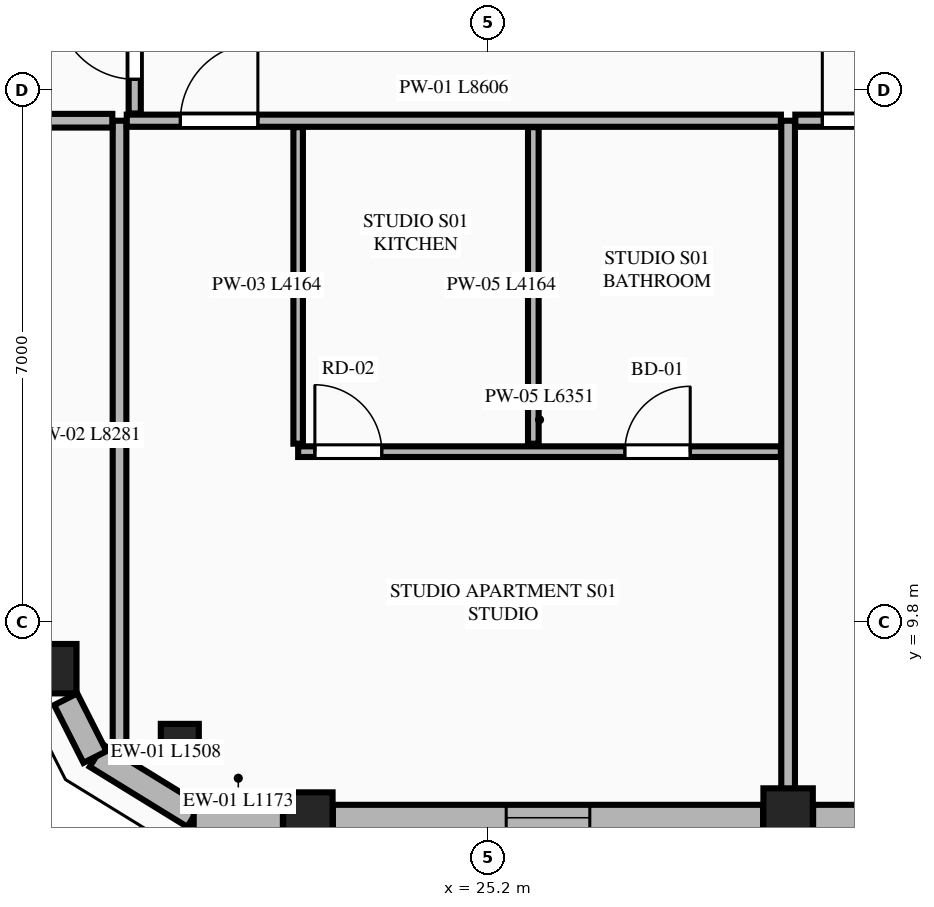
"""IFC4 building model, lengths in metres.
Left out: names, types, materials, properties, quantities, classifications, styles, units other than length and angle.
Written with IfcOpenShell. Run it as: python <this file> out.ifc"""

import sys

from ifc_helpers import new_model, si_unit, direction, frame, frame_2d, origin, origin_2d, place, context, subcontext, project, spatial, rectangle, extrude, element, fill, save


model = new_model("IFC4")
c1 = context("Model", 3, precision=1e-05, world=origin(), true_north=direction((0.0, 1.0)))
c2 = subcontext(c1, "Body", "Model", "MODEL_VIEW")
j1 = project(units=[si_unit("LENGTHUNIT", "METRE"), si_unit("PLANEANGLEUNIT", "RADIAN")], contexts=[c1])
p1 = place(None, origin())
s1 = spatial("IfcSite", under=j1, at=p1, CompositionType="ELEMENT")
p2 = place(p1, origin())
s2 = spatial("IfcBuilding", under=s1, at=p2, CompositionType="ELEMENT")
p3 = place(p2, frame((0.0, 0.0, 274.45)))
s3 = spatial("IfcBuildingStorey", under=s2, at=p3, CompositionType="ELEMENT", Elevation=274.45)
for number, where, z_axis, x_axis in (
    (1, (22.828, 7.239, 0.0), (0.0, 0.0, 1.0), (1.0, 0.0, 0.0)),
    (2, (29.146, 7.292, 0.0), (0.0, 0.0, 1.0), (1.0, 0.0, 0.0)),
    (3, (19.459, 9.191, 0.0), (0.0, 0.0, 1.0), (1.0, 0.0, 0.0)),
):
    element("IfcColumn", number, at=place(p3, frame(where, z_axis=z_axis, x_axis=x_axis)), inside=s3, PredefinedType="COLUMN", context=c2, shape_type="SweptSolid", body=[
        extrude(rectangle(XDim=0.65, YDim=0.65, at=origin_2d()), origin(), (0.0, 0.0, 1.0), 3.65),
    ])
p4 = place(p3, frame((21.143, 8.215, 0.0), z_axis=(0.0, 0.0, 1.0), x_axis=(0.865256437757, -0.501329529272, 0.0)))
e4 = element("IfcColumn", 4, at=p4, inside=s3, PredefinedType="PILASTER", context=c2, shape_type="SweptSolid", body=[
    extrude(rectangle(XDim=0.5, YDim=0.35, at=origin_2d()), origin(), (0.0, 0.0, 1.0), 3.65),
])
p5 = place(p3, frame((20.047, 8.045, 0.0), z_axis=(0.0, 0.0, 1.0), x_axis=(0.851680557619, -0.52406128246, 0.0)))
e5 = element("IfcWall", 5, at=p5, inside=s3, PredefinedType="STANDARD", context=c2, shape_type="SweptSolid", body=[
    extrude(rectangle(XDim=1.508, YDim=0.34, at=frame_2d((0.754, 0.0))), origin(), (0.0, 0.0, 1.0), 3.37),
])
p6 = place(p3, frame((21.326, 7.23, 0.0), z_axis=(0.0, 0.0, 1.0), x_axis=(1.0, 0.0, 0.0)))
e6 = element("IfcWall", 6, at=p6, inside=s3, PredefinedType="STANDARD", context=c2, shape_type="SweptSolid", body=[
    extrude(rectangle(XDim=1.173, YDim=0.34, at=frame_2d((0.586, 0.0))), origin(), (0.0, 0.0, 1.0), 3.37),
])
p7 = place(p3, frame((23.157, 7.23, 0.0), z_axis=(0.0, 0.0, 1.0), x_axis=(1.0, 0.0, 0.0)))
e7 = element("IfcWall", 7, at=p7, inside=s3, PredefinedType="STANDARD", context=c2, shape_type="SweptSolid", body=[
    extrude(rectangle(XDim=5.66, YDim=0.34, at=frame_2d((2.83, 0.0))), origin(), (0.0, 0.0, 1.0), 2.46),
])
p8 = place(p7, frame((2.28, 0.0, 0.75)))
e8 = element("IfcOpeningElement", 8, at=p8, cuts=e7, PredefinedType="OPENING", context=c2, shape_type="SweptSolid", body=[
    extrude(rectangle(XDim=1.1, YDim=1.56, at=frame_2d((0.55, 0.78))), frame((0.0, 0.18, 0.0), z_axis=(0.0, -1.0, 0.0), x_axis=(1.0, 0.0, 0.0)), (0.0, 0.0, 1.0), 0.36),
])
p9 = place(p3, frame((29.475, 7.23, 0.0), z_axis=(0.0, 0.0, 1.0), x_axis=(1.0, 0.0, 0.0)))
e9 = element("IfcWall", 9, at=p9, inside=s3, PredefinedType="STANDARD", context=c2, shape_type="SweptSolid", body=[
    extrude(rectangle(XDim=5.85, YDim=0.34, at=frame_2d((2.925, 0.0))), origin(), (0.0, 0.0, 1.0), 2.46),
])
p10 = place(p9, frame((2.375, 0.0, 0.0)))
e10 = element("IfcOpeningElement", 10, at=p10, cuts=e9, PredefinedType="OPENING", context=c2, shape_type="SweptSolid", body=[
    extrude(rectangle(XDim=1.1, YDim=2.25, at=frame_2d((0.55, 1.125))), frame((0.0, 0.18, 0.0), z_axis=(0.0, -1.0, 0.0), x_axis=(1.0, 0.0, 0.0)), (0.0, 0.0, 1.0), 0.36),
])
p11 = place(p3, frame((19.642, 8.789, 0.0), z_axis=(0.0, 0.0, 1.0), x_axis=(0.451907025977, -0.8920650424, 0.0)))
e11 = element("IfcWall", 11, at=p11, inside=s3, PredefinedType="STANDARD", context=c2, shape_type="SweptSolid", body=[
    extrude(rectangle(XDim=0.852, YDim=0.34, at=frame_2d((0.426, 0.0))), origin(), (0.0, 0.0, 1.0), 3.37),
])
p12 = place(p3, frame((20.35, 8.119, 0.0), z_axis=(0.0, 0.0, 1.0), x_axis=(0.0, 1.0, 0.0)))
e12 = element("IfcWall", 12, at=p12, inside=s3, PredefinedType="PARTITIONING", context=c2, shape_type="SweptSolid", body=[
    extrude(rectangle(XDim=8.281, YDim=0.18, at=frame_2d((4.141, 0.0))), origin(), (0.0, 0.0, 1.0), 3.37),
])
p13 = place(p3, frame((29.146, 7.405, 0.0), z_axis=(0.0, 0.0, 1.0), x_axis=(0.0, 1.0, 0.0)))
e13 = element("IfcWall", 13, at=p13, inside=s3, PredefinedType="PARTITIONING", context=c2, shape_type="SweptSolid", body=[
    extrude(rectangle(XDim=8.995, YDim=0.18, at=frame_2d((4.498, 0.0))), origin(), (0.0, 0.0, 1.0), 2.294),
])
p14 = place(p3, frame((20.445, 16.4, 0.0), z_axis=(0.0, 0.0, 1.0), x_axis=(1.0, 0.0, 0.0)))
e14 = element("IfcWall", 14, at=p14, inside=s3, PredefinedType="PARTITIONING", context=c2, shape_type="SweptSolid", body=[
    extrude(rectangle(XDim=8.606, YDim=0.16, at=frame_2d((4.303, 0.0))), origin(), (0.0, 0.0, 1.0), 3.37),
])
p15 = place(p14, frame((0.705, 0.0, 0.0)))
e15 = element("IfcOpeningElement", 15, at=p15, cuts=e14, PredefinedType="OPENING", context=c2, shape_type="SweptSolid", body=[
    extrude(rectangle(XDim=1.02, YDim=2.25, at=frame_2d((0.51, 1.125))), frame((0.0, 0.09, 0.0), z_axis=(0.0, -1.0, 0.0), x_axis=(1.0, 0.0, 0.0)), (0.0, 0.0, 1.0), 0.18),
])
p16 = place(p3, frame((22.7, 12.151, 0.0), z_axis=(0.0, 0.0, 1.0), x_axis=(0.0, 1.0, 0.0)))
e16 = element("IfcWall", 16, at=p16, inside=s3, PredefinedType="PARTITIONING", context=c2, shape_type="SweptSolid", body=[
    extrude(rectangle(XDim=4.164, YDim=0.125, at=frame_2d((2.082, 0.0))), origin(), (0.0, 0.0, 1.0), 2.677),
])
p17 = place(p3, frame((22.7, 12.046, 0.0), z_axis=(0.0, 0.0, 1.0), x_axis=(1.0, 0.0, 0.0)))
e17 = element("IfcWall", 17, at=p17, inside=s3, PredefinedType="PLUMBINGWALL", context=c2, shape_type="SweptSolid", body=[
    extrude(rectangle(XDim=6.351, YDim=0.14, at=frame_2d((3.176, 0.0))), origin(), (0.0, 0.0, 1.0), 3.37),
])
p18 = place(p17, frame((4.298, 0.0, 0.0)))
e18 = element("IfcOpeningElement", 18, at=p18, cuts=e17, PredefinedType="OPENING", context=c2, shape_type="SweptSolid", body=[
    extrude(rectangle(XDim=0.86, YDim=2.1, at=frame_2d((0.43, 1.05))), frame((0.0, 0.08, 0.0), z_axis=(0.0, -1.0, 0.0), x_axis=(1.0, 0.0, 0.0)), (0.0, 0.0, 1.0), 0.16),
])
p19 = place(p17, frame((0.22, 0.0, 0.0)))
e19 = element("IfcOpeningElement", 19, at=p19, cuts=e17, PredefinedType="OPENING", context=c2, shape_type="SweptSolid", body=[
    extrude(rectangle(XDim=0.88, YDim=2.15, at=frame_2d((0.44, 1.075))), frame((0.0, 0.08, 0.0), z_axis=(0.0, -1.0, 0.0), x_axis=(1.0, 0.0, 0.0)), (0.0, 0.0, 1.0), 0.16),
])
p20 = place(p3, frame((25.794, 12.151, 0.0), z_axis=(0.0, 0.0, 1.0), x_axis=(0.0, 1.0, 0.0)))
e20 = element("IfcWall", 20, at=p20, inside=s3, PredefinedType="PLUMBINGWALL", context=c2, shape_type="SweptSolid", body=[
    extrude(rectangle(XDim=4.164, YDim=0.14, at=frame_2d((2.082, 0.0))), origin(), (0.0, 0.0, 1.0), 3.37),
])
p21 = place(p3, frame((29.241, 16.4, 0.0), z_axis=(0.0, 0.0, 1.0), x_axis=(1.0, 0.0, 0.0)))
e21 = element("IfcWall", 21, at=p21, inside=s3, PredefinedType="PARTITIONING", context=c2, shape_type="SweptSolid", body=[
    extrude(rectangle(XDim=6.318, YDim=0.16, at=frame_2d((3.159, 0.0))), origin(), (0.0, 0.0, 1.0), 3.37),
])
p22 = place(p21, frame((0.355, 0.0, 0.0)))
e22 = element("IfcOpeningElement", 22, at=p22, cuts=e21, PredefinedType="OPENING", context=c2, shape_type="SweptSolid", body=[
    extrude(rectangle(XDim=1.02, YDim=2.25, at=frame_2d((0.51, 1.125))), frame((0.0, 0.09, 0.0), z_axis=(0.0, -1.0, 0.0), x_axis=(1.0, 0.0, 0.0)), (0.0, 0.0, 1.0), 0.18),
])
p23 = place(p3, frame((16.034, 16.4, 0.0), z_axis=(0.0, 0.0, 1.0), x_axis=(1.0, 0.0, 0.0)))
e23 = element("IfcWall", 23, at=p23, inside=s3, PredefinedType="PARTITIONING", context=c2, shape_type="SweptSolid", body=[
    extrude(rectangle(XDim=4.221, YDim=0.18, at=frame_2d((2.11, 0.0))), origin(), (0.0, 0.0, 1.0), 3.37),
])
p24 = place(p3, frame((20.55, 16.495, 0.0), z_axis=(0.0, 0.0, 1.0), x_axis=(0.0, 1.0, 0.0)))
e24 = element("IfcWall", 24, at=p24, inside=s3, PredefinedType="PARTITIONING", context=c2, shape_type="SweptSolid", body=[
    extrude(rectangle(XDim=18.41, YDim=0.16, at=frame_2d((9.205, 0.0))), origin(), (0.0, 0.0, 1.0), 3.057),
])
p25 = place(p24, frame((0.45, 0.0, 0.0)))
e25 = element("IfcOpeningElement", 25, at=p25, cuts=e24, PredefinedType="OPENING", context=c2, shape_type="SweptSolid", body=[
    extrude(rectangle(XDim=1.02, YDim=2.25, at=frame_2d((0.51, 1.125))), frame((0.0, 0.09, 0.0), z_axis=(0.0, -1.0, 0.0), x_axis=(1.0, 0.0, 0.0)), (0.0, 0.0, 1.0), 0.18),
])
p26 = place(p8, origin())
e26 = element("IfcWindow", 26, at=p26, inside=s3, PartitioningType="SINGLE_PANEL", PredefinedType="WINDOW", context=c2, shape_type="SweptSolid", body=[
    extrude(rectangle(XDim=1.1, YDim=1.56, at=frame_2d((0.55, 0.78))), frame((0.0, 0.03, 0.0), z_axis=(0.0, -1.0, 0.0), x_axis=(1.0, 0.0, 0.0)), (0.0, 0.0, 1.0), 0.06),
])
fill(e8, e26)
p27 = place(p18, origin())
e27 = element("IfcDoor", 27, at=p27, inside=s3, OperationType="SINGLE_SWING_RIGHT", PredefinedType="DOOR", context=c2, shape_type="SweptSolid", body=[
    extrude(rectangle(XDim=0.86, YDim=2.1, at=frame_2d((0.43, 1.05))), frame((0.0, 0.025, 0.0), z_axis=(0.0, -1.0, 0.0), x_axis=(1.0, 0.0, 0.0)), (0.0, 0.0, 1.0), 0.05),
])
fill(e18, e27)
p28 = place(p15, origin())
e28 = element("IfcDoor", 28, at=p28, inside=s3, OperationType="SINGLE_SWING_RIGHT", PredefinedType="DOOR", context=c2, shape_type="SweptSolid", body=[
    extrude(rectangle(XDim=1.02, YDim=2.25, at=frame_2d((0.51, 1.125))), frame((0.0, 0.025, 0.0), z_axis=(0.0, -1.0, 0.0), x_axis=(1.0, 0.0, 0.0)), (0.0, 0.0, 1.0), 0.05),
])
fill(e15, e28)
p29 = place(p19, origin())
e29 = element("IfcDoor", 29, at=p29, inside=s3, OperationType="SINGLE_SWING_LEFT", PredefinedType="DOOR", context=c2, shape_type="SweptSolid", body=[
    extrude(rectangle(XDim=0.88, YDim=2.15, at=frame_2d((0.44, 1.075))), frame((0.0, 0.025, 0.0), z_axis=(0.0, -1.0, 0.0), x_axis=(1.0, 0.0, 0.0)), (0.0, 0.0, 1.0), 0.05),
])
fill(e19, e29)
p30 = place(p22, origin())
e30 = element("IfcDoor", 30, at=p30, inside=s3, OperationType="SINGLE_SWING_LEFT", PredefinedType="DOOR", context=c2, shape_type="SweptSolid", body=[
    extrude(rectangle(XDim=1.02, YDim=2.25, at=frame_2d((0.51, 1.125))), frame((0.0, 0.025, 0.0), z_axis=(0.0, -1.0, 0.0), x_axis=(1.0, 0.0, 0.0)), (0.0, 0.0, 1.0), 0.05),
])
fill(e22, e30)
p31 = place(p25, origin())
e31 = element("IfcDoor", 31, at=p31, inside=s3, OperationType="SINGLE_SWING_RIGHT", PredefinedType="DOOR", context=c2, shape_type="SweptSolid", body=[
    extrude(rectangle(XDim=1.02, YDim=2.25, at=frame_2d((0.51, 1.125))), frame((0.0, 0.025, 0.0), z_axis=(0.0, -1.0, 0.0), x_axis=(1.0, 0.0, 0.0)), (0.0, 0.0, 1.0), 0.05),
])
fill(e25, e31)
save(model, sys.argv[1])
